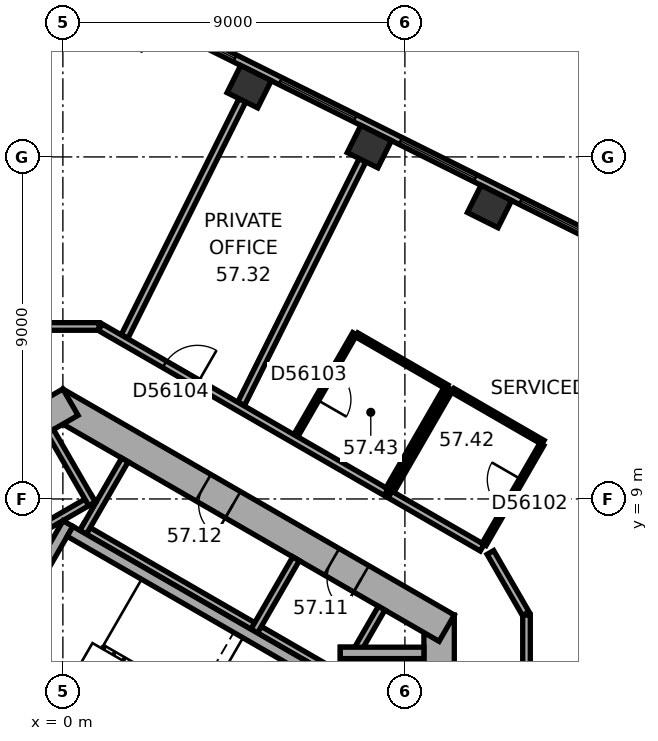
"""IFC4 building model, lengths in metres.
Left out: names, types, materials, properties, quantities, classifications, styles, units other than length and angle.
Written with IfcOpenShell. Run it as: python <this file> out.ifc"""

import sys

from ifc_helpers import new_model, si_unit, direction, frame, frame_2d, origin, origin_2d, place, context, subcontext, project, spatial, rectangle, extrude, element, fill, save


model = new_model("IFC4")
c1 = context("Model", 3, precision=1e-05, world=origin(), true_north=direction((0.0, 1.0)))
c2 = subcontext(c1, "Body", "Model", "MODEL_VIEW")
j1 = project(units=[si_unit("LENGTHUNIT", "METRE"), si_unit("PLANEANGLEUNIT", "RADIAN")], contexts=[c1])
p1 = place(None, origin())
s1 = spatial("IfcSite", under=j1, at=p1, CompositionType="ELEMENT")
p2 = place(p1, origin())
s2 = spatial("IfcBuilding", under=s1, at=p2, CompositionType="ELEMENT")
p3 = place(p2, frame((0.0, 0.0, 232.8)))
s3 = spatial("IfcBuildingStorey", under=s2, at=p3, CompositionType="ELEMENT", Elevation=232.8)
for number, where, z_axis, x_axis in (
    (1, (11.227, 16.695, 0.0), (0.0, 0.0, 1.0), (-0.895, 0.446, 0.0)),
    (2, (8.064, 18.271, 0.0), (0.0, 0.0, 1.0), (-0.895, 0.446, 0.0)),
    (3, (4.902, 19.848, 0.0), (0.0, 0.0, 1.0), (-0.895, 0.446, 0.0)),
):
    element("IfcColumn", number, at=place(p3, frame(where, z_axis=z_axis, x_axis=x_axis)), inside=s3, PredefinedType="COLUMN", context=c2, shape_type="SweptSolid", body=[
        extrude(rectangle(XDim=0.9, YDim=0.8, at=origin_2d()), origin(), (0.0, 0.0, 1.0), 3.7),
    ])
p4 = place(p3, frame((9.9, -5.947, 0.0), z_axis=(0.0, 0.0, 1.0), x_axis=(0.0, 1.0, 0.0)))
e4 = element("IfcWall", 4, at=p4, inside=s3, PredefinedType="SHEAR", context=c2, shape_type="SweptSolid", body=[
    extrude(rectangle(XDim=11.894, YDim=0.8, at=frame_2d((5.947, 0.0))), origin(), (0.0, 0.0, 1.0), 3.7),
])
p5 = place(p4, frame((6.147, 0.0, 0.0)))
e5 = element("IfcOpeningElement", 5, at=p5, cuts=e4, PredefinedType="OPENING", context=c2, shape_type="SweptSolid", body=[
    extrude(rectangle(XDim=1.5, YDim=2.1, at=frame_2d((0.75, 1.05))), frame((0.0, 0.41, 0.0), z_axis=(0.0, -1.0, 0.0), x_axis=(1.0, 0.0, 0.0)), (0.0, 0.0, 1.0), 0.82),
])
p6 = place(p4, frame((2.997, 0.0, 0.0)))
e6 = element("IfcOpeningElement", 6, at=p6, cuts=e4, PredefinedType="OPENING", context=c2, shape_type="SweptSolid", body=[
    extrude(rectangle(XDim=0.9, YDim=2.1, at=frame_2d((0.45, 1.05))), frame((0.0, 0.41, 0.0), z_axis=(0.0, -1.0, 0.0), x_axis=(1.0, 0.0, 0.0)), (0.0, 0.0, 1.0), 0.82),
])
p7 = place(p3, frame((10.1, 5.6, 0.0), z_axis=(0.0, 0.0, 1.0), x_axis=(-0.866023897231, 0.500002609418, 0.0)))
e7 = element("IfcWall", 7, at=p7, inside=s3, PredefinedType="SHEAR", context=c2, shape_type="SweptSolid", body=[
    extrude(rectangle(XDim=11.894, YDim=0.8, at=frame_2d((5.947, 0.0))), origin(), (0.0, 0.0, 1.0), 3.7),
])
p8 = place(p7, frame((2.597, 0.0, 0.0)))
e8 = element("IfcOpeningElement", 8, at=p8, cuts=e7, PredefinedType="OPENING", context=c2, shape_type="SweptSolid", body=[
    extrude(rectangle(XDim=0.9, YDim=2.1, at=frame_2d((0.45, 1.05))), frame((0.0, 0.41, 0.0), z_axis=(0.0, -1.0, 0.0), x_axis=(1.0, 0.0, 0.0)), (0.0, 0.0, 1.0), 0.82),
])
p9 = place(p7, frame((6.497, 0.0, 0.0)))
e9 = element("IfcOpeningElement", 9, at=p9, cuts=e7, PredefinedType="OPENING", context=c2, shape_type="SweptSolid", body=[
    extrude(rectangle(XDim=0.9, YDim=2.1, at=frame_2d((0.45, 1.05))), frame((0.0, 0.41, 0.0), z_axis=(0.0, -1.0, 0.0), x_axis=(1.0, 0.0, 0.0)), (0.0, 0.0, 1.0), 0.82),
])
p10 = place(p3, frame((0.2, 11.547, 0.0), z_axis=(0.0, 0.0, 1.0), x_axis=(-0.866023897231, -0.500002609418, 0.0)))
e10 = element("IfcWall", 10, at=p10, inside=s3, PredefinedType="SHEAR", context=c2, shape_type="SweptSolid", body=[
    extrude(rectangle(XDim=11.894, YDim=0.8, at=frame_2d((5.947, 0.0))), origin(), (0.0, 0.0, 1.0), 3.7),
])
p11 = place(p10, frame((6.147, 0.0, 0.0)))
e11 = element("IfcOpeningElement", 11, at=p11, cuts=e10, PredefinedType="OPENING", context=c2, shape_type="SweptSolid", body=[
    extrude(rectangle(XDim=1.5, YDim=2.1, at=frame_2d((0.75, 1.05))), frame((0.0, 0.41, 0.0), z_axis=(0.0, -1.0, 0.0), x_axis=(1.0, 0.0, 0.0)), (0.0, 0.0, 1.0), 0.82),
])
p12 = place(p10, frame((2.997, 0.0, 0.0)))
e12 = element("IfcOpeningElement", 12, at=p12, cuts=e10, PredefinedType="OPENING", context=c2, shape_type="SweptSolid", body=[
    extrude(rectangle(XDim=0.9, YDim=2.1, at=frame_2d((0.45, 1.05))), frame((0.0, 0.41, 0.0), z_axis=(0.0, -1.0, 0.0), x_axis=(1.0, 0.0, 0.0)), (0.0, 0.0, 1.0), 0.82),
])
p13 = place(p3, frame((18.299, 13.727, 0.0), z_axis=(0.0, 0.0, 1.0), x_axis=(-0.894934554817, 0.44619742558, 0.0)))
e13 = element("IfcWall", 13, at=p13, inside=s3, PredefinedType="STANDARD", context=c2, shape_type="SweptSolid", body=[
    extrude(rectangle(XDim=18.841, YDim=0.2, at=frame_2d((9.421, 0.0))), origin(), (0.0, 0.0, 1.0), 3.7),
])
p14 = place(p13, frame((1.253, 0.0, 0.9)))
e14 = element("IfcOpeningElement", 14, at=p14, cuts=e13, PredefinedType="OPENING", context=c2, shape_type="SweptSolid", body=[
    extrude(rectangle(XDim=2.2, YDim=2.0, at=frame_2d((1.1, 1.0))), frame((0.0, 0.11, 0.0), z_axis=(0.0, -1.0, 0.0), x_axis=(1.0, 0.0, 0.0)), (0.0, 0.0, 1.0), 0.22),
])
p15 = place(p13, frame((4.786, 0.0, 0.9)))
e15 = element("IfcOpeningElement", 15, at=p15, cuts=e13, PredefinedType="OPENING", context=c2, shape_type="SweptSolid", body=[
    extrude(rectangle(XDim=2.2, YDim=2.0, at=frame_2d((1.1, 1.0))), frame((0.0, 0.11, 0.0), z_axis=(0.0, -1.0, 0.0), x_axis=(1.0, 0.0, 0.0)), (0.0, 0.0, 1.0), 0.22),
])
p16 = place(p13, frame((8.32, 0.0, 0.9)))
e16 = element("IfcOpeningElement", 16, at=p16, cuts=e13, PredefinedType="OPENING", context=c2, shape_type="SweptSolid", body=[
    extrude(rectangle(XDim=2.2, YDim=2.0, at=frame_2d((1.1, 1.0))), frame((0.0, 0.11, 0.0), z_axis=(0.0, -1.0, 0.0), x_axis=(1.0, 0.0, 0.0)), (0.0, 0.0, 1.0), 0.22),
])
p17 = place(p13, frame((11.854, 0.0, 0.9)))
e17 = element("IfcOpeningElement", 17, at=p17, cuts=e13, PredefinedType="OPENING", context=c2, shape_type="SweptSolid", body=[
    extrude(rectangle(XDim=2.2, YDim=2.0, at=frame_2d((1.1, 1.0))), frame((0.0, 0.11, 0.0), z_axis=(0.0, -1.0, 0.0), x_axis=(1.0, 0.0, 0.0)), (0.0, 0.0, 1.0), 0.22),
])
p18 = place(p13, frame((15.387, 0.0, 0.9)))
e18 = element("IfcOpeningElement", 18, at=p18, cuts=e13, PredefinedType="OPENING", context=c2, shape_type="SweptSolid", body=[
    extrude(rectangle(XDim=2.2, YDim=2.0, at=frame_2d((1.1, 1.0))), frame((0.0, 0.11, 0.0), z_axis=(0.0, -1.0, 0.0), x_axis=(1.0, 0.0, 0.0)), (0.0, 0.0, 1.0), 0.22),
])
p19 = place(p3, frame((7.424, 4.259, 0.0), z_axis=(0.0, 0.0, 1.0), x_axis=(-0.866026010844, 0.49999894854, 0.0)))
e19 = element("IfcWall", 19, at=p19, inside=s3, PredefinedType="PARTITIONING", context=c2, shape_type="SweptSolid", body=[
    extrude(rectangle(XDim=8.0, YDim=0.2, at=frame_2d((4.0, 0.0))), origin(), (0.0, 0.0, 1.0), 3.42),
])
for number, where, z_axis, x_axis in (
    (20, (7.287, 4.222, 0.0), (0.0, 0.0, 1.0), (0.5, 0.866, 0.0)),
    (21, (5.036, 5.522, 0.0), (0.0, 0.0, 1.0), (0.5, 0.866, 0.0)),
    (22, (0.532, 8.122, 0.0), (0.0, 0.0, 1.0), (0.5, 0.866, 0.0)),
):
    element("IfcWall", number, at=place(p3, frame(where, z_axis=z_axis, x_axis=x_axis)), inside=s3, PredefinedType="PARTITIONING", context=c2, shape_type="SweptSolid", body=[
        extrude(rectangle(XDim=2.2, YDim=0.2, at=frame_2d((1.1, 0.0))), origin(), (0.0, 0.0, 1.0), 3.42),
    ])
p20 = place(p3, frame((0.803, 9.009, 0.0), z_axis=(0.0, 0.0, 1.0), x_axis=(-0.866028230842, -0.499995103361, 0.0)))
e23 = element("IfcWall", 23, at=p20, inside=s3, PredefinedType="PARTITIONING", context=c2, shape_type="SweptSolid", body=[
    extrude(rectangle(XDim=5.4, YDim=0.2, at=frame_2d((2.7, 0.0))), origin(), (0.0, 0.0, 1.0), 3.42),
])
p21 = place(p3, frame((0.767, 8.872, 0.0), z_axis=(0.0, 0.0, 1.0), x_axis=(-0.499994660107, 0.866028486751, 0.0)))
e24 = element("IfcWall", 24, at=p21, inside=s3, PredefinedType="PARTITIONING", context=c2, shape_type="SweptSolid", body=[
    extrude(rectangle(XDim=2.2, YDim=0.2, at=frame_2d((1.1, 0.0))), origin(), (0.0, 0.0, 1.0), 3.42),
])
p22 = place(p3, frame((4.158, 0.602, 0.0), z_axis=(0.0, 0.0, 1.0), x_axis=(0.499977259774, 0.866038532462, 0.0)))
e25 = element("IfcWall", 25, at=p22, inside=s3, PredefinedType="SHEAR", context=c2, shape_type="SweptSolid", body=[
    extrude(rectangle(XDim=4.7, YDim=0.3, at=frame_2d((2.35, 0.0))), origin(), (0.0, 0.0, 1.0), 3.42),
])
p23 = place(p22, frame((0.8, 0.0, 0.0)))
e26 = element("IfcOpeningElement", 26, at=p23, cuts=e25, PredefinedType="OPENING", context=c2, shape_type="SweptSolid", body=[
    extrude(rectangle(XDim=1.2, YDim=2.1, at=frame_2d((0.6, 1.05))), frame((0.0, 0.16, 0.0), z_axis=(0.0, -1.0, 0.0), x_axis=(1.0, 0.0, 0.0)), (0.0, 0.0, 1.0), 0.32),
])
p24 = place(p3, frame((-2.216, 4.282, 0.0), z_axis=(0.0, 0.0, 1.0), x_axis=(0.499977259774, 0.866038532462, 0.0)))
e27 = element("IfcWall", 27, at=p24, inside=s3, PredefinedType="SHEAR", context=c2, shape_type="SweptSolid", body=[
    extrude(rectangle(XDim=4.7, YDim=0.3, at=frame_2d((2.35, 0.0))), origin(), (0.0, 0.0, 1.0), 3.42),
])
p25 = place(p3, frame((6.303, 4.617, 0.0), z_axis=(0.0, 0.0, 1.0), x_axis=(-0.866027801685, 0.499995846692, 0.0)))
e28 = element("IfcWall", 28, at=p25, inside=s3, PredefinedType="SHEAR", context=c2, shape_type="SweptSolid", body=[
    extrude(rectangle(XDim=7.06, YDim=0.3, at=frame_2d((3.53, 0.0))), origin(), (0.0, 0.0, 1.0), 3.42),
])
p26 = place(p3, frame((7.45, 1.75, 0.0), z_axis=(0.0, 0.0, 1.0), x_axis=(0.0, 1.0, 0.0)))
e29 = element("IfcWall", 29, at=p26, inside=s3, PredefinedType="SHEAR", context=c2, shape_type="SweptSolid", body=[
    extrude(rectangle(XDim=3.35, YDim=0.3, at=frame_2d((1.675, 0.0))), origin(), (0.0, 0.0, 1.0), 3.42),
])
p27 = place(p3, frame((7.3, 4.95, 0.0), z_axis=(0.0, 0.0, 1.0), x_axis=(1.0, 0.0, 0.0)))
e30 = element("IfcWall", 30, at=p27, inside=s3, PredefinedType="SHEAR", context=c2, shape_type="SweptSolid", body=[
    extrude(rectangle(XDim=2.2, YDim=0.3, at=frame_2d((1.1, 0.0))), origin(), (0.0, 0.0, 1.0), 3.42),
])
p28 = place(p3, frame((0.95, 13.539, 0.0), z_axis=(0.0, 0.0, 1.0), x_axis=(-1.0, 0.0, 0.0)))
e31 = element("IfcWall", 31, at=p28, inside=s3, PredefinedType="PARTITIONING", context=c2, shape_type="SweptSolid", body=[
    extrude(rectangle(XDim=1.9, YDim=0.2, at=frame_2d((0.95, 0.0))), origin(), (0.0, 0.0, 1.0), 3.42),
])
p29 = place(p3, frame((4.723, 19.49, 0.0), z_axis=(0.0, 0.0, 1.0), x_axis=(-0.446186614574, -0.894939944898, 0.0)))
e32 = element("IfcWall", 32, at=p29, inside=s3, PredefinedType="PARTITIONING", context=c2, shape_type="SweptSolid", body=[
    extrude(rectangle(XDim=6.944, YDim=0.2, at=frame_2d((3.472, 0.0))), origin(), (0.0, 0.0, 1.0), 2.87),
])
p30 = place(p3, frame((6.13, 10.664, 0.0), z_axis=(0.0, 0.0, 1.0), x_axis=(0.499967891604, 0.866043940782, 0.0)))
e33 = element("IfcWall", 33, at=p30, inside=s3, PredefinedType="PARTITIONING", context=c2, shape_type="SweptSolid", body=[
    extrude(rectangle(XDim=3.1, YDim=0.12, at=frame_2d((1.55, 0.0))), origin(), (0.0, 0.0, 1.0), 3.42),
])
p31 = place(p30, frame((1.1, 0.0, 0.0)))
e34 = element("IfcOpeningElement", 34, at=p31, cuts=e33, PredefinedType="OPENING", context=c2, shape_type="SweptSolid", body=[
    extrude(rectangle(XDim=0.9, YDim=2.1, at=frame_2d((0.45, 1.05))), frame((0.0, 0.07, 0.0), z_axis=(0.0, -1.0, 0.0), x_axis=(1.0, 0.0, 0.0)), (0.0, 0.0, 1.0), 0.14),
])
p32 = place(p3, frame((7.732, 13.318, 0.0), z_axis=(0.0, 0.0, 1.0), x_axis=(0.866057988685, -0.499943557049, 0.0)))
e35 = element("IfcWall", 35, at=p32, inside=s3, PredefinedType="PARTITIONING", context=c2, shape_type="SweptSolid", body=[
    extrude(rectangle(XDim=2.74, YDim=0.12, at=frame_2d((1.37, 0.0))), origin(), (0.0, 0.0, 1.0), 3.42),
])
p33 = place(p3, frame((7.886, 17.913, 0.0), z_axis=(0.0, 0.0, 1.0), x_axis=(-0.446204015428, -0.894931269213, 0.0)))
e36 = element("IfcWall", 36, at=p33, inside=s3, PredefinedType="PARTITIONING", context=c2, shape_type="SweptSolid", body=[
    extrude(rectangle(XDim=7.16, YDim=0.2, at=frame_2d((3.58, 0.0))), origin(), (0.0, 0.0, 1.0), 3.42),
])
p34 = place(p3, frame((8.505, 9.177, 0.0), z_axis=(0.0, 0.0, 1.0), x_axis=(-0.866019839902, 0.500009636803, 0.0)))
e37 = element("IfcWall", 37, at=p34, inside=s3, PredefinedType="PARTITIONING", context=c2, shape_type="SweptSolid", body=[
    extrude(rectangle(XDim=8.683, YDim=0.2, at=frame_2d((4.342, 0.0))), origin(), (0.0, 0.0, 1.0), 3.42),
])
p35 = place(p34, frame((5.73, 0.0, 0.0)))
e38 = element("IfcOpeningElement", 38, at=p35, cuts=e37, PredefinedType="OPENING", context=c2, shape_type="SweptSolid", body=[
    extrude(rectangle(XDim=1.0, YDim=2.1, at=frame_2d((0.5, 1.05))), frame((0.0, 0.11, 0.0), z_axis=(0.0, -1.0, 0.0), x_axis=(1.0, 0.0, 0.0)), (0.0, 0.0, 1.0), 0.22),
])
p36 = place(p3, frame((8.659, 9.204, 0.0), z_axis=(0.0, 0.0, 1.0), x_axis=(0.499933790963, 0.866063626216, 0.0)))
e39 = element("IfcWall", 39, at=p36, inside=s3, PredefinedType="PARTITIONING", context=c2, shape_type="SweptSolid", body=[
    extrude(rectangle(XDim=3.1, YDim=0.12, at=frame_2d((1.55, 0.0))), origin(), (0.0, 0.0, 1.0), 3.42),
])
p37 = place(p3, frame((10.075, 11.896, 0.0), z_axis=(0.0, 0.0, 1.0), x_axis=(-0.499991248344, -0.866030456496, 0.0)))
e40 = element("IfcWall", 40, at=p37, inside=s3, PredefinedType="PARTITIONING", context=c2, shape_type="SweptSolid", body=[
    extrude(rectangle(XDim=3.04, YDim=0.12, at=frame_2d((1.52, 0.0))), origin(), (0.0, 0.0, 1.0), 3.42),
])
p38 = place(p3, frame((10.26, 11.858, 0.0), z_axis=(0.0, 0.0, 1.0), x_axis=(0.866019409031, -0.500010383074, 0.0)))
e41 = element("IfcWall", 41, at=p38, inside=s3, PredefinedType="PARTITIONING", context=c2, shape_type="SweptSolid", body=[
    extrude(rectangle(XDim=2.74, YDim=0.12, at=frame_2d((1.37, 0.0))), origin(), (0.0, 0.0, 1.0), 3.42),
])
p39 = place(p3, frame((11.033, 7.717, 0.0), z_axis=(0.0, 0.0, 1.0), x_axis=(-0.865996816683, 0.500049511043, 0.0)))
e42 = element("IfcWall", 42, at=p39, inside=s3, PredefinedType="PARTITIONING", context=c2, shape_type="SweptSolid", body=[
    extrude(rectangle(XDim=2.8, YDim=0.2, at=frame_2d((1.4, 0.0))), origin(), (0.0, 0.0, 1.0), 3.42),
])
p40 = place(p3, frame((12.18, 5.981, 0.0), z_axis=(0.0, 0.0, 1.0), x_axis=(-0.499964847546, 0.866045698112, 0.0)))
e43 = element("IfcWall", 43, at=p40, inside=s3, PredefinedType="PARTITIONING", context=c2, shape_type="SweptSolid", body=[
    extrude(rectangle(XDim=1.86, YDim=0.2, at=frame_2d((0.93, 0.0))), origin(), (0.0, 0.0, 1.0), 3.42),
])
p41 = place(p3, frame((12.2, 2.598, 0.0), z_axis=(0.0, 0.0, 1.0), x_axis=(0.0, 1.0, 0.0)))
e44 = element("IfcWall", 44, at=p41, inside=s3, PredefinedType="PARTITIONING", context=c2, shape_type="SweptSolid", body=[
    extrude(rectangle(XDim=3.349, YDim=0.2, at=frame_2d((1.674, 0.0))), origin(), (0.0, 0.0, 1.0), 3.42),
])
p42 = place(p3, frame((12.604, 10.436, 0.0), z_axis=(0.0, 0.0, 1.0), x_axis=(-0.500026023896, -0.86601037836, 0.0)))
e45 = element("IfcWall", 45, at=p42, inside=s3, PredefinedType="PARTITIONING", context=c2, shape_type="SweptSolid", body=[
    extrude(rectangle(XDim=3.04, YDim=0.12, at=frame_2d((1.52, 0.0))), origin(), (0.0, 0.0, 1.0), 3.42),
])
p43 = place(p42, frame((1.07, 0.0, 0.0)))
e46 = element("IfcOpeningElement", 46, at=p43, cuts=e45, PredefinedType="OPENING", context=c2, shape_type="SweptSolid", body=[
    extrude(rectangle(XDim=0.9, YDim=2.1, at=frame_2d((0.45, 1.05))), frame((0.0, 0.07, 0.0), z_axis=(0.0, -1.0, 0.0), x_axis=(1.0, 0.0, 0.0)), (0.0, 0.0, 1.0), 0.14),
])
p44 = place(p15, origin())
e47 = element("IfcWindow", 47, at=p44, inside=s3, PartitioningType="SINGLE_PANEL", PredefinedType="WINDOW", context=c2, shape_type="SweptSolid", body=[
    extrude(rectangle(XDim=2.2, YDim=2.0, at=frame_2d((1.1, 1.0))), frame((0.0, 0.03, 0.0), z_axis=(0.0, -1.0, 0.0), x_axis=(1.0, 0.0, 0.0)), (0.0, 0.0, 1.0), 0.06),
])
fill(e15, e47)
p45 = place(p16, origin())
e48 = element("IfcWindow", 48, at=p45, inside=s3, PartitioningType="SINGLE_PANEL", PredefinedType="WINDOW", context=c2, shape_type="SweptSolid", body=[
    extrude(rectangle(XDim=2.2, YDim=2.0, at=frame_2d((1.1, 1.0))), frame((0.0, 0.03, 0.0), z_axis=(0.0, -1.0, 0.0), x_axis=(1.0, 0.0, 0.0)), (0.0, 0.0, 1.0), 0.06),
])
fill(e16, e48)
p46 = place(p17, origin())
e49 = element("IfcWindow", 49, at=p46, inside=s3, PartitioningType="SINGLE_PANEL", PredefinedType="WINDOW", context=c2, shape_type="SweptSolid", body=[
    extrude(rectangle(XDim=2.2, YDim=2.0, at=frame_2d((1.1, 1.0))), frame((0.0, 0.03, 0.0), z_axis=(0.0, -1.0, 0.0), x_axis=(1.0, 0.0, 0.0)), (0.0, 0.0, 1.0), 0.06),
])
fill(e17, e49)
p47 = place(p18, origin())
e50 = element("IfcWindow", 50, at=p47, inside=s3, PartitioningType="SINGLE_PANEL", PredefinedType="WINDOW", context=c2, shape_type="SweptSolid", body=[
    extrude(rectangle(XDim=2.2, YDim=2.0, at=frame_2d((1.1, 1.0))), frame((0.0, 0.03, 0.0), z_axis=(0.0, -1.0, 0.0), x_axis=(1.0, 0.0, 0.0)), (0.0, 0.0, 1.0), 0.06),
])
fill(e18, e50)
p48 = place(p8, origin())
e51 = element("IfcDoor", 51, at=p48, inside=s3, OperationType="SINGLE_SWING_LEFT", PredefinedType="DOOR", context=c2, shape_type="SweptSolid", body=[
    extrude(rectangle(XDim=0.9, YDim=2.1, at=frame_2d((0.45, 1.05))), frame((0.0, 0.025, 0.0), z_axis=(0.0, -1.0, 0.0), x_axis=(1.0, 0.0, 0.0)), (0.0, 0.0, 1.0), 0.05),
])
fill(e8, e51)
p49 = place(p9, origin())
e52 = element("IfcDoor", 52, at=p49, inside=s3, OperationType="SINGLE_SWING_LEFT", PredefinedType="DOOR", context=c2, shape_type="SweptSolid", body=[
    extrude(rectangle(XDim=0.9, YDim=2.1, at=frame_2d((0.45, 1.05))), frame((0.0, 0.025, 0.0), z_axis=(0.0, -1.0, 0.0), x_axis=(1.0, 0.0, 0.0)), (0.0, 0.0, 1.0), 0.05),
])
fill(e9, e52)
p50 = place(p43, origin())
e53 = element("IfcDoor", 53, at=p50, inside=s3, OperationType="SINGLE_SWING_LEFT", PredefinedType="DOOR", context=c2, shape_type="SweptSolid", body=[
    extrude(rectangle(XDim=0.9, YDim=2.1, at=frame_2d((0.45, 1.05))), frame((0.0, 0.025, 0.0), z_axis=(0.0, -1.0, 0.0), x_axis=(1.0, 0.0, 0.0)), (0.0, 0.0, 1.0), 0.05),
])
fill(e46, e53)
p51 = place(p31, origin())
e54 = element("IfcDoor", 54, at=p51, inside=s3, OperationType="SINGLE_SWING_LEFT", PredefinedType="DOOR", context=c2, shape_type="SweptSolid", body=[
    extrude(rectangle(XDim=0.9, YDim=2.1, at=frame_2d((0.45, 1.05))), frame((0.0, 0.025, 0.0), z_axis=(0.0, -1.0, 0.0), x_axis=(1.0, 0.0, 0.0)), (0.0, 0.0, 1.0), 0.05),
])
fill(e34, e54)
p52 = place(p35, origin())
e55 = element("IfcDoor", 55, at=p52, inside=s3, OperationType="SINGLE_SWING_LEFT", PredefinedType="DOOR", context=c2, shape_type="SweptSolid", body=[
    extrude(rectangle(XDim=1.0, YDim=2.1, at=frame_2d((0.5, 1.05))), frame((0.0, 0.025, 0.0), z_axis=(0.0, -1.0, 0.0), x_axis=(1.0, 0.0, 0.0)), (0.0, 0.0, 1.0), 0.05),
])
fill(e38, e55)
save(model, sys.argv[1])
